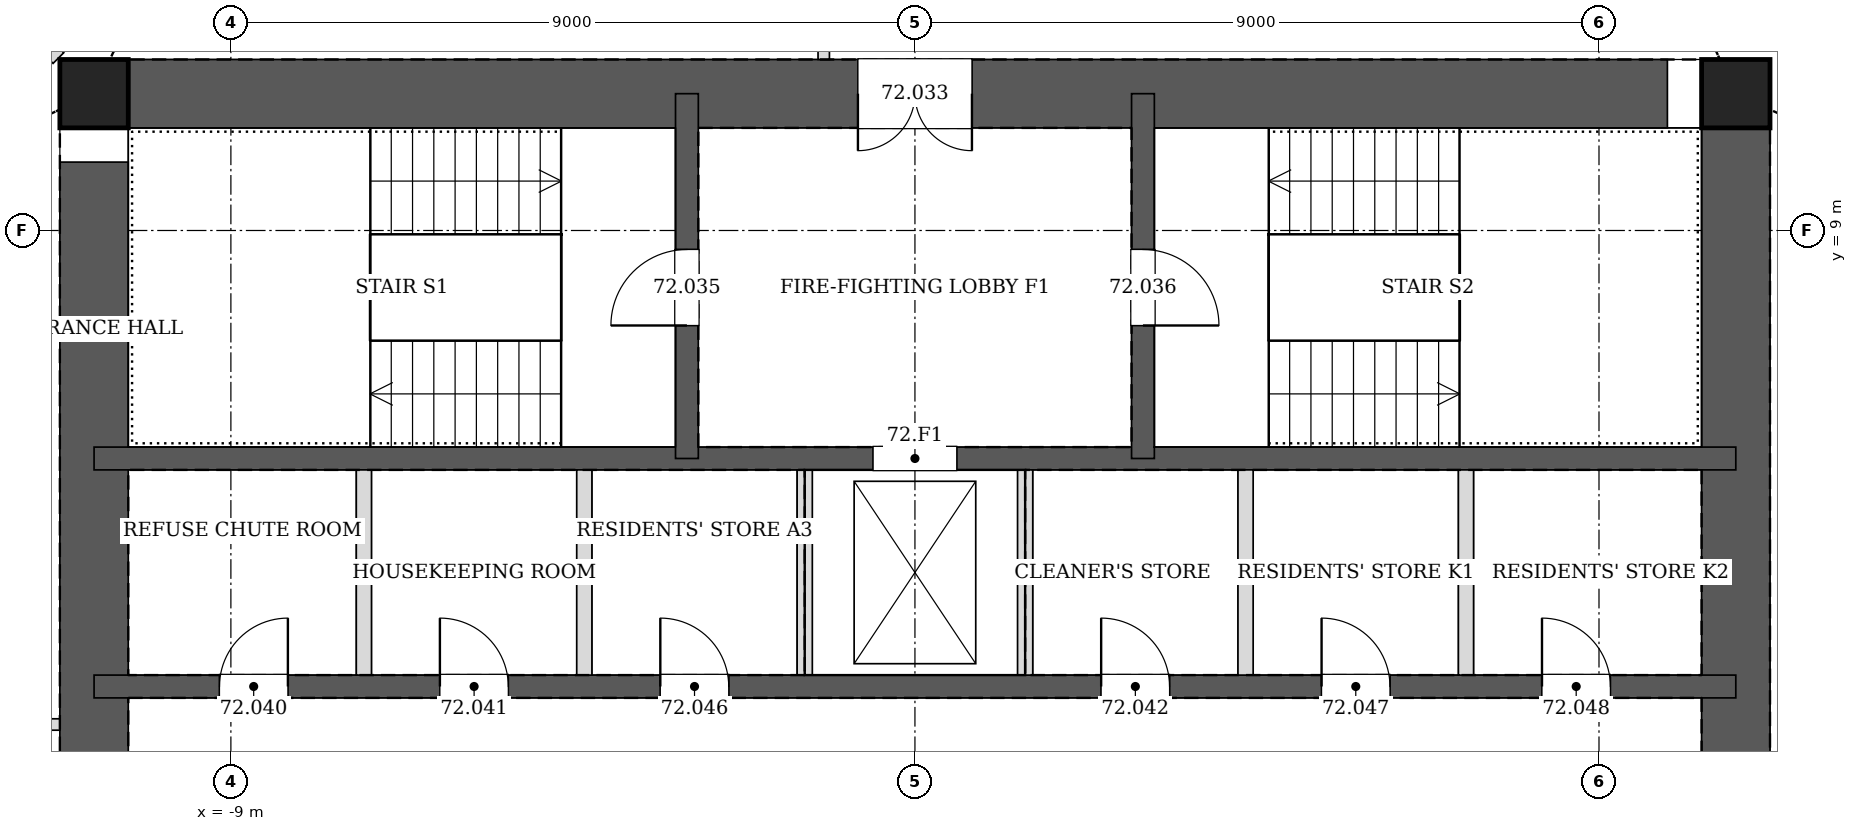
"""IFC4 building model, lengths in metres.
Left out: names, types, materials, properties, quantities, classifications, styles, units other than length and angle.
Written with IfcOpenShell. Run it as: python <this file> out.ifc"""

import sys

from ifc_helpers import new_model, si_unit, direction, frame, frame_2d, origin, origin_2d, place, context, subcontext, project, spatial, rectangle, hollow_rectangle, extrude, element, fill, save


model = new_model("IFC4")
c1 = context("Model", 3, precision=1e-05, world=origin(), true_north=direction((0.0, 1.0)))
c2 = subcontext(c1, "Body", "Model", "MODEL_VIEW")
j1 = project(units=[si_unit("LENGTHUNIT", "METRE"), si_unit("PLANEANGLEUNIT", "RADIAN")], contexts=[c1])
p1 = place(None, origin())
s1 = spatial("IfcSite", under=j1, at=p1, CompositionType="ELEMENT")
p2 = place(p1, origin())
s2 = spatial("IfcBuilding", under=s1, at=p2, CompositionType="ELEMENT")
p3 = place(p2, frame((0.0, 0.0, 294.6)))
s3 = spatial("IfcBuildingStorey", under=s2, at=p3, CompositionType="ELEMENT", Elevation=294.6)
for number, where, z_axis, x_axis in (
    (1, (10.8, 10.8, 0.0), (0.0, 0.0, 1.0), (1.0, 0.0, 0.0)),
    (2, (-10.8, 10.8, 0.0), (0.0, 0.0, 1.0), (1.0, 0.0, 0.0)),
):
    element("IfcColumn", number, at=place(p3, frame(where, z_axis=z_axis, x_axis=x_axis)), inside=s3, PredefinedType="COLUMN", context=c2, shape_type="SweptSolid", body=[
        extrude(hollow_rectangle(XDim=0.9, YDim=0.9, WallThickness=0.04, at=origin_2d()), origin(), (0.0, 0.0, 1.0), 3.4),
    ])
p4 = place(p3, frame((10.8, -10.8, 0.0), z_axis=(0.0, 0.0, 1.0), x_axis=(0.0, 1.0, 0.0)))
e3 = element("IfcWall", 3, at=p4, inside=s3, PredefinedType="SOLIDWALL", context=c2, shape_type="SweptSolid", body=[
    extrude(rectangle(XDim=21.6, YDim=0.9, at=frame_2d((10.8, 0.0))), origin(), (0.0, 0.0, 1.0), 3.4),
])
p5 = place(p4, frame((11.7, 0.0, 0.0)))
e4 = element("IfcOpeningElement", 4, at=p5, cuts=e3, PredefinedType="OPENING", context=c2, shape_type="SweptSolid", body=[
    extrude(rectangle(XDim=1.2, YDim=2.1, at=frame_2d((0.6, 1.05))), frame((0.0, 0.46, 0.0), z_axis=(0.0, -1.0, 0.0), x_axis=(1.0, 0.0, 0.0)), (0.0, 0.0, 1.0), 0.92),
])
p6 = place(p4, frame((8.7, 0.0, 0.0)))
e5 = element("IfcOpeningElement", 5, at=p6, cuts=e3, PredefinedType="OPENING", context=c2, shape_type="SweptSolid", body=[
    extrude(rectangle(XDim=1.2, YDim=2.1, at=frame_2d((0.6, 1.05))), frame((0.0, 0.46, 0.0), z_axis=(0.0, -1.0, 0.0), x_axis=(1.0, 0.0, 0.0)), (0.0, 0.0, 1.0), 0.92),
])
p7 = place(p3, frame((10.8, 10.8, 0.0), z_axis=(0.0, 0.0, 1.0), x_axis=(-1.0, 0.0, 0.0)))
e6 = element("IfcWall", 6, at=p7, inside=s3, PredefinedType="SOLIDWALL", context=c2, shape_type="SweptSolid", body=[
    extrude(rectangle(XDim=21.6, YDim=0.9, at=frame_2d((10.8, 0.0))), origin(), (0.0, 0.0, 1.0), 3.4),
])
p8 = place(p7, frame((10.05, 0.0, 0.0)))
e7 = element("IfcOpeningElement", 7, at=p8, cuts=e6, PredefinedType="OPENING", context=c2, shape_type="SweptSolid", body=[
    extrude(rectangle(XDim=1.5, YDim=2.1, at=frame_2d((0.75, 1.05))), frame((0.0, 0.46, 0.0), z_axis=(0.0, -1.0, 0.0), x_axis=(1.0, 0.0, 0.0)), (0.0, 0.0, 1.0), 0.92),
])
p9 = place(p3, frame((-10.8, 10.8, 0.0), z_axis=(0.0, 0.0, 1.0), x_axis=(0.0, -1.0, 0.0)))
e8 = element("IfcWall", 8, at=p9, inside=s3, PredefinedType="SOLIDWALL", context=c2, shape_type="SweptSolid", body=[
    extrude(rectangle(XDim=21.6, YDim=0.9, at=frame_2d((10.8, 0.0))), origin(), (0.0, 0.0, 1.0), 3.4),
])
p10 = place(p9, frame((8.7, 0.0, 0.0)))
e9 = element("IfcOpeningElement", 9, at=p10, cuts=e8, PredefinedType="OPENING", context=c2, shape_type="SweptSolid", body=[
    extrude(rectangle(XDim=1.2, YDim=2.1, at=frame_2d((0.6, 1.05))), frame((0.0, 0.46, 0.0), z_axis=(0.0, -1.0, 0.0), x_axis=(1.0, 0.0, 0.0)), (0.0, 0.0, 1.0), 0.92),
])
p11 = place(p9, frame((11.7, 0.0, 0.0)))
e10 = element("IfcOpeningElement", 10, at=p11, cuts=e8, PredefinedType="OPENING", context=c2, shape_type="SweptSolid", body=[
    extrude(rectangle(XDim=1.2, YDim=2.1, at=frame_2d((0.6, 1.05))), frame((0.0, 0.46, 0.0), z_axis=(0.0, -1.0, 0.0), x_axis=(1.0, 0.0, 0.0)), (0.0, 0.0, 1.0), 0.92),
])
p12 = place(p3, frame((-10.8, 3.0, 0.0), z_axis=(0.0, 0.0, 1.0), x_axis=(1.0, 0.0, 0.0)))
e11 = element("IfcWall", 11, at=p12, inside=s3, PredefinedType="SOLIDWALL", context=c2, shape_type="SweptSolid", body=[
    extrude(rectangle(XDim=21.6, YDim=0.3, at=frame_2d((10.8, 0.0))), origin(), (0.0, 0.0, 1.0), 3.4),
])
p13 = place(p12, frame((1.65, 0.0, 0.0)))
e12 = element("IfcOpeningElement", 12, at=p13, cuts=e11, PredefinedType="OPENING", context=c2, shape_type="SweptSolid", body=[
    extrude(rectangle(XDim=0.9, YDim=2.1, at=frame_2d((0.45, 1.05))), frame((0.0, 0.16, 0.0), z_axis=(0.0, -1.0, 0.0), x_axis=(1.0, 0.0, 0.0)), (0.0, 0.0, 1.0), 0.32),
])
p14 = place(p12, frame((4.55, 0.0, 0.0)))
e13 = element("IfcOpeningElement", 13, at=p14, cuts=e11, PredefinedType="OPENING", context=c2, shape_type="SweptSolid", body=[
    extrude(rectangle(XDim=0.9, YDim=2.1, at=frame_2d((0.45, 1.05))), frame((0.0, 0.16, 0.0), z_axis=(0.0, -1.0, 0.0), x_axis=(1.0, 0.0, 0.0)), (0.0, 0.0, 1.0), 0.32),
])
p15 = place(p12, frame((13.25, 0.0, 0.0)))
e14 = element("IfcOpeningElement", 14, at=p15, cuts=e11, PredefinedType="OPENING", context=c2, shape_type="SweptSolid", body=[
    extrude(rectangle(XDim=0.9, YDim=2.1, at=frame_2d((0.45, 1.05))), frame((0.0, 0.16, 0.0), z_axis=(0.0, -1.0, 0.0), x_axis=(1.0, 0.0, 0.0)), (0.0, 0.0, 1.0), 0.32),
])
p16 = place(p12, frame((7.45, 0.0, 0.0)))
e15 = element("IfcOpeningElement", 15, at=p16, cuts=e11, PredefinedType="OPENING", context=c2, shape_type="SweptSolid", body=[
    extrude(rectangle(XDim=0.9, YDim=2.1, at=frame_2d((0.45, 1.05))), frame((0.0, 0.16, 0.0), z_axis=(0.0, -1.0, 0.0), x_axis=(1.0, 0.0, 0.0)), (0.0, 0.0, 1.0), 0.32),
])
p17 = place(p12, frame((16.15, 0.0, 0.0)))
e16 = element("IfcOpeningElement", 16, at=p17, cuts=e11, PredefinedType="OPENING", context=c2, shape_type="SweptSolid", body=[
    extrude(rectangle(XDim=0.9, YDim=2.1, at=frame_2d((0.45, 1.05))), frame((0.0, 0.16, 0.0), z_axis=(0.0, -1.0, 0.0), x_axis=(1.0, 0.0, 0.0)), (0.0, 0.0, 1.0), 0.32),
])
p18 = place(p12, frame((19.05, 0.0, 0.0)))
e17 = element("IfcOpeningElement", 17, at=p18, cuts=e11, PredefinedType="OPENING", context=c2, shape_type="SweptSolid", body=[
    extrude(rectangle(XDim=0.9, YDim=2.1, at=frame_2d((0.45, 1.05))), frame((0.0, 0.16, 0.0), z_axis=(0.0, -1.0, 0.0), x_axis=(1.0, 0.0, 0.0)), (0.0, 0.0, 1.0), 0.32),
])
p19 = place(p3, frame((-10.8, 6.0, 0.0), z_axis=(0.0, 0.0, 1.0), x_axis=(1.0, 0.0, 0.0)))
e18 = element("IfcWall", 18, at=p19, inside=s3, PredefinedType="SOLIDWALL", context=c2, shape_type="SweptSolid", body=[
    extrude(rectangle(XDim=21.6, YDim=0.3, at=frame_2d((10.8, 0.0))), origin(), (0.0, 0.0, 1.0), 3.4),
])
p20 = place(p19, frame((10.25, 0.0, 0.0)))
e19 = element("IfcOpeningElement", 19, at=p20, cuts=e18, PredefinedType="OPENING", context=c2, shape_type="SweptSolid", body=[
    extrude(rectangle(XDim=1.1, YDim=2.1, at=frame_2d((0.55, 1.05))), frame((0.0, 0.16, 0.0), z_axis=(0.0, -1.0, 0.0), x_axis=(1.0, 0.0, 0.0)), (0.0, 0.0, 1.0), 0.32),
])
p21 = place(p3, frame((-3.0, 6.0, 0.0), z_axis=(0.0, 0.0, 1.0), x_axis=(0.0, 1.0, 0.0)))
e20 = element("IfcWall", 20, at=p21, inside=s3, PredefinedType="SOLIDWALL", context=c2, shape_type="SweptSolid", body=[
    extrude(rectangle(XDim=4.8, YDim=0.3, at=frame_2d((2.4, 0.0))), origin(), (0.0, 0.0, 1.0), 3.4),
])
p22 = place(p21, frame((1.75, 0.0, 0.0)))
e21 = element("IfcOpeningElement", 21, at=p22, cuts=e20, PredefinedType="OPENING", context=c2, shape_type="SweptSolid", body=[
    extrude(rectangle(XDim=1.0, YDim=2.1, at=frame_2d((0.5, 1.05))), frame((0.0, 0.16, 0.0), z_axis=(0.0, -1.0, 0.0), x_axis=(1.0, 0.0, 0.0)), (0.0, 0.0, 1.0), 0.32),
])
p23 = place(p3, frame((3.0, 6.0, 0.0), z_axis=(0.0, 0.0, 1.0), x_axis=(0.0, 1.0, 0.0)))
e22 = element("IfcWall", 22, at=p23, inside=s3, PredefinedType="SOLIDWALL", context=c2, shape_type="SweptSolid", body=[
    extrude(rectangle(XDim=4.8, YDim=0.3, at=frame_2d((2.4, 0.0))), origin(), (0.0, 0.0, 1.0), 3.4),
])
p24 = place(p23, frame((1.75, 0.0, 0.0)))
e23 = element("IfcOpeningElement", 23, at=p24, cuts=e22, PredefinedType="OPENING", context=c2, shape_type="SweptSolid", body=[
    extrude(rectangle(XDim=1.0, YDim=2.1, at=frame_2d((0.5, 1.05))), frame((0.0, 0.16, 0.0), z_axis=(0.0, -1.0, 0.0), x_axis=(1.0, 0.0, 0.0)), (0.0, 0.0, 1.0), 0.32),
])
p25 = place(p3, frame((-1.2, 12.9, 0.0), z_axis=(0.0, 0.0, 1.0), x_axis=(0.0, -1.0, 0.0)))
e24 = element("IfcWall", 24, at=p25, inside=s3, PredefinedType="PARTITIONING", context=c2, shape_type="SweptSolid", body=[
    extrude(rectangle(XDim=1.65, YDim=0.15, at=frame_2d((0.825, 0.0))), origin(), (0.0, 0.0, 1.0), 3.2),
])
p26 = place(p3, frame((-11.25, 2.5, 0.0), z_axis=(0.0, 0.0, 1.0), x_axis=(-1.0, 0.0, 0.0)))
e25 = element("IfcWall", 25, at=p26, inside=s3, PredefinedType="PARTITIONING", context=c2, shape_type="SweptSolid", body=[
    extrude(rectangle(XDim=1.65, YDim=0.15, at=frame_2d((0.825, 0.0))), origin(), (0.0, 0.0, 1.0), 3.2),
])
p27 = place(p26, frame((0.35, 0.0, 0.0)))
e26 = element("IfcOpeningElement", 26, at=p27, cuts=e25, PredefinedType="OPENING", context=c2, shape_type="SweptSolid", body=[
    extrude(rectangle(XDim=0.95, YDim=2.1, at=frame_2d((0.475, 1.05))), frame((0.0, 0.085, 0.0), z_axis=(0.0, -1.0, 0.0), x_axis=(1.0, 0.0, 0.0)), (0.0, 0.0, 1.0), 0.17),
])
p28 = place(p3, frame((-12.901, 12.901, 0.0), z_axis=(0.0, 0.0, 1.0), x_axis=(0.707106781187, -0.707106781187, 0.0)))
e27 = element("IfcWall", 27, at=p28, inside=s3, PredefinedType="PARTITIONING", context=c2, shape_type="SweptSolid", body=[
    extrude(rectangle(XDim=2.308, YDim=0.2, at=frame_2d((1.154, 0.0))), origin(), (0.0, 0.0, 1.0), 2.591),
])
for number, where, z_axis, x_axis in (
    (28, (-7.25, 3.15, 0.0), (0.0, 0.0, 1.0), (0.0, 1.0, 0.0)),
    (29, (-4.35, 3.15, 0.0), (0.0, 0.0, 1.0), (0.0, 1.0, 0.0)),
    (30, (-1.45, 3.15, 0.0), (0.0, 0.0, 1.0), (0.0, 1.0, 0.0)),
    (31, (1.45, 3.15, 0.0), (0.0, 0.0, 1.0), (0.0, 1.0, 0.0)),
    (32, (4.35, 3.15, 0.0), (0.0, 0.0, 1.0), (0.0, 1.0, 0.0)),
    (33, (7.25, 3.15, 0.0), (0.0, 0.0, 1.0), (0.0, 1.0, 0.0)),
):
    element("IfcWall", number, at=place(p3, frame(where, z_axis=z_axis, x_axis=x_axis)), inside=s3, PredefinedType="PARTITIONING", context=c2, shape_type="SweptSolid", body=[
        extrude(rectangle(XDim=2.7, YDim=0.2, at=frame_2d((1.35, 0.0))), origin(), (0.0, 0.0, 1.0), 3.2),
    ])
p29 = place(p8, origin())
e34 = element("IfcDoor", 34, at=p29, inside=s3, OperationType="DOUBLE_DOOR_SINGLE_SWING", PredefinedType="DOOR", context=c2, shape_type="SweptSolid", body=[
    extrude(rectangle(XDim=1.5, YDim=2.1, at=frame_2d((0.75, 1.05))), frame((0.0, 0.025, 0.0), z_axis=(0.0, -1.0, 0.0), x_axis=(1.0, 0.0, 0.0)), (0.0, 0.0, 1.0), 0.05),
])
fill(e7, e34)
p30 = place(p22, origin())
e35 = element("IfcDoor", 35, at=p30, inside=s3, OperationType="SINGLE_SWING_LEFT", PredefinedType="DOOR", context=c2, shape_type="SweptSolid", body=[
    extrude(rectangle(XDim=1.0, YDim=2.1, at=frame_2d((0.5, 1.05))), frame((0.0, 0.025, 0.0), z_axis=(0.0, -1.0, 0.0), x_axis=(1.0, 0.0, 0.0)), (0.0, 0.0, 1.0), 0.05),
])
fill(e21, e35)
p31 = place(p24, frame((1.0, 0.0, 0.0), z_axis=(0.0, 0.0, 1.0), x_axis=(-1.0, 0.0, 0.0)))
e36 = element("IfcDoor", 36, at=p31, inside=s3, OperationType="SINGLE_SWING_RIGHT", PredefinedType="DOOR", context=c2, shape_type="SweptSolid", body=[
    extrude(rectangle(XDim=1.0, YDim=2.1, at=frame_2d((0.5, 1.05))), frame((0.0, 0.025, 0.0), z_axis=(0.0, -1.0, 0.0), x_axis=(1.0, 0.0, 0.0)), (0.0, 0.0, 1.0), 0.05),
])
fill(e23, e36)
p32 = place(p13, origin())
e37 = element("IfcDoor", 37, at=p32, inside=s3, OperationType="SINGLE_SWING_RIGHT", PredefinedType="DOOR", context=c2, shape_type="SweptSolid", body=[
    extrude(rectangle(XDim=0.9, YDim=2.1, at=frame_2d((0.45, 1.05))), frame((0.0, 0.025, 0.0), z_axis=(0.0, -1.0, 0.0), x_axis=(1.0, 0.0, 0.0)), (0.0, 0.0, 1.0), 0.05),
])
fill(e12, e37)
p33 = place(p14, origin())
e38 = element("IfcDoor", 38, at=p33, inside=s3, OperationType="SINGLE_SWING_LEFT", PredefinedType="DOOR", context=c2, shape_type="SweptSolid", body=[
    extrude(rectangle(XDim=0.9, YDim=2.1, at=frame_2d((0.45, 1.05))), frame((0.0, 0.025, 0.0), z_axis=(0.0, -1.0, 0.0), x_axis=(1.0, 0.0, 0.0)), (0.0, 0.0, 1.0), 0.05),
])
fill(e13, e38)
p34 = place(p15, origin())
e39 = element("IfcDoor", 39, at=p34, inside=s3, OperationType="SINGLE_SWING_LEFT", PredefinedType="DOOR", context=c2, shape_type="SweptSolid", body=[
    extrude(rectangle(XDim=0.9, YDim=2.1, at=frame_2d((0.45, 1.05))), frame((0.0, 0.025, 0.0), z_axis=(0.0, -1.0, 0.0), x_axis=(1.0, 0.0, 0.0)), (0.0, 0.0, 1.0), 0.05),
])
fill(e14, e39)
p35 = place(p16, origin())
e40 = element("IfcDoor", 40, at=p35, inside=s3, OperationType="SINGLE_SWING_LEFT", PredefinedType="DOOR", context=c2, shape_type="SweptSolid", body=[
    extrude(rectangle(XDim=0.9, YDim=2.1, at=frame_2d((0.45, 1.05))), frame((0.0, 0.025, 0.0), z_axis=(0.0, -1.0, 0.0), x_axis=(1.0, 0.0, 0.0)), (0.0, 0.0, 1.0), 0.05),
])
fill(e15, e40)
p36 = place(p17, origin())
e41 = element("IfcDoor", 41, at=p36, inside=s3, OperationType="SINGLE_SWING_LEFT", PredefinedType="DOOR", context=c2, shape_type="SweptSolid", body=[
    extrude(rectangle(XDim=0.9, YDim=2.1, at=frame_2d((0.45, 1.05))), frame((0.0, 0.025, 0.0), z_axis=(0.0, -1.0, 0.0), x_axis=(1.0, 0.0, 0.0)), (0.0, 0.0, 1.0), 0.05),
])
fill(e16, e41)
p37 = place(p18, origin())
e42 = element("IfcDoor", 42, at=p37, inside=s3, OperationType="SINGLE_SWING_LEFT", PredefinedType="DOOR", context=c2, shape_type="SweptSolid", body=[
    extrude(rectangle(XDim=0.9, YDim=2.1, at=frame_2d((0.45, 1.05))), frame((0.0, 0.025, 0.0), z_axis=(0.0, -1.0, 0.0), x_axis=(1.0, 0.0, 0.0)), (0.0, 0.0, 1.0), 0.05),
])
fill(e17, e42)
p38 = place(p20, origin())
e43 = element("IfcDoor", 43, at=p38, inside=s3, OperationType="DOUBLE_DOOR_SLIDING", PredefinedType="DOOR", context=c2, shape_type="SweptSolid", body=[
    extrude(rectangle(XDim=1.1, YDim=2.1, at=frame_2d((0.55, 1.05))), frame((0.0, 0.025, 0.0), z_axis=(0.0, -1.0, 0.0), x_axis=(1.0, 0.0, 0.0)), (0.0, 0.0, 1.0), 0.05),
])
fill(e19, e43)
save(model, sys.argv[1])
